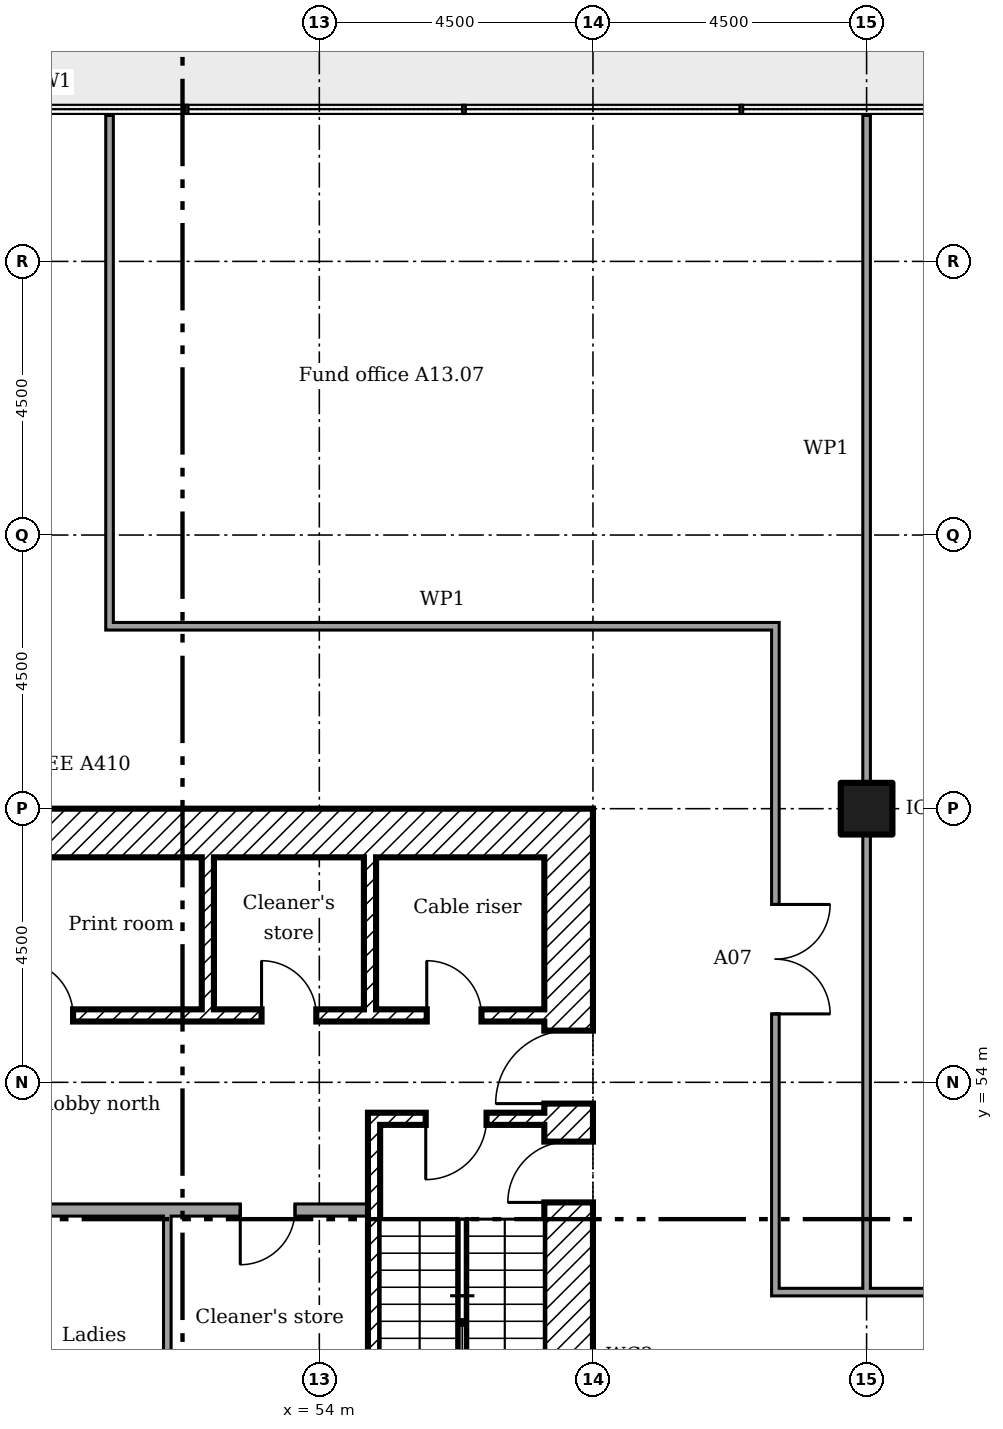
"""IFC4 building model, lengths in metres.
Left out: names, types, materials, properties, quantities, classifications, styles, units other than length and angle.
Written with IfcOpenShell. Run it as: python <this file> out.ifc"""

import sys

from ifc_helpers import new_model, si_unit, direction, frame, frame_2d, origin, origin_2d, place, context, subcontext, project, spatial, rectangle, extrude, element, fill, save


model = new_model("IFC4")
c1 = context("Model", 3, precision=1e-05, world=origin(), true_north=direction((0.0, 1.0)))
c2 = subcontext(c1, "Body", "Model", "MODEL_VIEW")
j1 = project(units=[si_unit("LENGTHUNIT", "METRE"), si_unit("PLANEANGLEUNIT", "RADIAN")], contexts=[c1])
p1 = place(None, origin())
s1 = spatial("IfcSite", under=j1, at=p1, CompositionType="ELEMENT")
p2 = place(p1, origin())
s2 = spatial("IfcBuilding", under=s1, at=p2, CompositionType="ELEMENT")
p3 = place(p2, frame((0.0, 0.0, 58.2)))
s3 = spatial("IfcBuildingStorey", under=s2, at=p3, CompositionType="ELEMENT", Elevation=58.2)
p4 = place(p3, frame((63.0, 58.5, 0.0)))
e1 = element("IfcColumn", 1, at=p4, inside=s3, PredefinedType="COLUMN", context=c2, shape_type="SweptSolid", body=[
    extrude(rectangle(XDim=0.85, YDim=0.85, at=origin_2d()), origin(), (0.0, 0.0, 1.0), 3.6),
])
p5 = place(p3, frame((58.1, 40.5, 0.0), z_axis=(0.0, 0.0, 1.0), x_axis=(0.0, 1.0, 0.0)))
e2 = element("IfcWall", 2, at=p5, inside=s3, PredefinedType="SHEAR", context=c2, shape_type="SweptSolid", body=[
    extrude(rectangle(XDim=18.0, YDim=0.8, at=frame_2d((9.0, 0.0))), origin(), (0.0, 0.0, 1.0), 3.35),
])
p6 = place(p5, frame((13.15, 0.0, 0.0)))
e3 = element("IfcOpeningElement", 3, at=p6, cuts=e2, PredefinedType="OPENING", context=c2, shape_type="SweptSolid", body=[
    extrude(rectangle(XDim=1.2, YDim=2.1, at=frame_2d((0.6, 1.05))), frame((0.0, 0.41, 0.0), z_axis=(0.0, -1.0, 0.0), x_axis=(1.0, 0.0, 0.0)), (0.0, 0.0, 1.0), 0.82),
])
p7 = place(p5, frame((3.9, 0.0, 0.0)))
e4 = element("IfcOpeningElement", 4, at=p7, cuts=e2, PredefinedType="OPENING", context=c2, shape_type="SweptSolid", body=[
    extrude(rectangle(XDim=1.8, YDim=2.1, at=frame_2d((0.9, 1.05))), frame((0.0, 0.41, 0.0), z_axis=(0.0, -1.0, 0.0), x_axis=(1.0, 0.0, 0.0)), (0.0, 0.0, 1.0), 0.82),
])
p8 = place(p5, frame((11.525, 0.0, 0.0)))
e5 = element("IfcOpeningElement", 5, at=p8, cuts=e2, PredefinedType="OPENING", context=c2, shape_type="SweptSolid", body=[
    extrude(rectangle(XDim=1.0, YDim=2.1, at=frame_2d((0.5, 1.05))), frame((0.0, 0.41, 0.0), z_axis=(0.0, -1.0, 0.0), x_axis=(1.0, 0.0, 0.0)), (0.0, 0.0, 1.0), 0.82),
])
p9 = place(p3, frame((41.3, 58.1, 0.0)))
e6 = element("IfcWall", 6, at=p9, inside=s3, PredefinedType="SHEAR", context=c2, shape_type="SweptSolid", body=[
    extrude(rectangle(XDim=16.4, YDim=0.8, at=frame_2d((8.2, 0.0))), origin(), (0.0, 0.0, 1.0), 3.35),
])
for number, where, z_axis, x_axis in (
    (7, (52.167, 57.7, 0.0), (0.0, 0.0, 1.0), (0.0, -1.0, 0.0)),
    (8, (54.833, 57.7, 0.0), (0.0, 0.0, 1.0), (0.0, -1.0, 0.0)),
):
    element("IfcWall", number, at=place(p3, frame(where, z_axis=z_axis, x_axis=x_axis)), inside=s3, PredefinedType="SHEAR", context=c2, shape_type="SweptSolid", body=[
        extrude(rectangle(XDim=2.5, YDim=0.2, at=frame_2d((1.25, 0.0))), origin(), (0.0, 0.0, 1.0), 3.35),
    ])
p10 = place(p3, frame((46.933, 55.1, 0.0)))
e9 = element("IfcWall", 9, at=p10, inside=s3, PredefinedType="SHEAR", context=c2, shape_type="SweptSolid", body=[
    extrude(rectangle(XDim=10.767, YDim=0.2, at=frame_2d((5.383, 0.0))), origin(), (0.0, 0.0, 1.0), 3.35),
])
p11 = place(p10, frame((8.833, 0.0, 0.0)))
e10 = element("IfcOpeningElement", 10, at=p11, cuts=e9, PredefinedType="OPENING", context=c2, shape_type="SweptSolid", body=[
    extrude(rectangle(XDim=0.9, YDim=2.1, at=frame_2d((0.45, 1.05))), frame((0.0, 0.11, 0.0), z_axis=(0.0, -1.0, 0.0), x_axis=(1.0, 0.0, 0.0)), (0.0, 0.0, 1.0), 0.22),
])
p12 = place(p10, frame((2.117, 0.0, 0.0)))
e11 = element("IfcOpeningElement", 11, at=p12, cuts=e9, PredefinedType="OPENING", context=c2, shape_type="SweptSolid", body=[
    extrude(rectangle(XDim=0.9, YDim=2.1, at=frame_2d((0.45, 1.05))), frame((0.0, 0.11, 0.0), z_axis=(0.0, -1.0, 0.0), x_axis=(1.0, 0.0, 0.0)), (0.0, 0.0, 1.0), 0.22),
])
p13 = place(p10, frame((6.117, 0.0, 0.0)))
e12 = element("IfcOpeningElement", 12, at=p13, cuts=e9, PredefinedType="OPENING", context=c2, shape_type="SweptSolid", body=[
    extrude(rectangle(XDim=0.9, YDim=2.1, at=frame_2d((0.45, 1.05))), frame((0.0, 0.11, 0.0), z_axis=(0.0, -1.0, 0.0), x_axis=(1.0, 0.0, 0.0)), (0.0, 0.0, 1.0), 0.22),
])
p14 = place(p3, frame((54.8, 53.4, 0.0)))
e13 = element("IfcWall", 13, at=p14, inside=s3, PredefinedType="SHEAR", context=c2, shape_type="SweptSolid", body=[
    extrude(rectangle(XDim=2.9, YDim=0.2, at=frame_2d((1.45, 0.0))), origin(), (0.0, 0.0, 1.0), 3.35),
])
p15 = place(p14, frame((0.95, 0.0, 0.0)))
e14 = element("IfcOpeningElement", 14, at=p15, cuts=e13, PredefinedType="OPENING", context=c2, shape_type="SweptSolid", body=[
    extrude(rectangle(XDim=1.0, YDim=2.1, at=frame_2d((0.5, 1.05))), frame((0.0, 0.11, 0.0), z_axis=(0.0, -1.0, 0.0), x_axis=(1.0, 0.0, 0.0)), (0.0, 0.0, 1.0), 0.22),
])
p16 = place(p3, frame((54.9, 46.8, 0.0), z_axis=(0.0, 0.0, 1.0), x_axis=(0.0, 1.0, 0.0)))
e15 = element("IfcWall", 15, at=p16, inside=s3, PredefinedType="SHEAR", context=c2, shape_type="SweptSolid", body=[
    extrude(rectangle(XDim=6.5, YDim=0.2, at=frame_2d((3.25, 0.0))), origin(), (0.0, 0.0, 1.0), 3.35),
])
p17 = place(p3, frame((44.2, 51.9, 0.0)))
e16 = element("IfcWall", 16, at=p17, inside=s3, PredefinedType="PARTITIONING", context=c2, shape_type="SweptSolid", body=[
    extrude(rectangle(XDim=10.6, YDim=0.2, at=frame_2d((5.3, 0.0))), origin(), (0.0, 0.0, 1.0), 3.35),
])
p18 = place(p17, frame((8.5, 0.0, 0.0)))
e17 = element("IfcOpeningElement", 17, at=p18, cuts=e16, PredefinedType="OPENING", context=c2, shape_type="SweptSolid", body=[
    extrude(rectangle(XDim=0.9, YDim=2.1, at=frame_2d((0.45, 1.05))), frame((0.0, 0.11, 0.0), z_axis=(0.0, -1.0, 0.0), x_axis=(1.0, 0.0, 0.0)), (0.0, 0.0, 1.0), 0.22),
])
p19 = place(p3, frame((51.5, 49.5, 0.0), z_axis=(0.0, 0.0, 1.0), x_axis=(0.0, 1.0, 0.0)))
e18 = element("IfcWall", 18, at=p19, inside=s3, PredefinedType="PARTITIONING", context=c2, shape_type="SweptSolid", body=[
    extrude(rectangle(XDim=2.3, YDim=0.125, at=frame_2d((1.15, 0.0))), origin(), (0.0, 0.0, 1.0), 3.35),
])
p20 = place(p3, frame((61.438, 50.55, 0.0)))
e19 = element("IfcWall", 19, at=p20, inside=s3, PredefinedType="PARTITIONING", context=c2, shape_type="SweptSolid", body=[
    extrude(rectangle(XDim=8.462, YDim=0.125, at=frame_2d((4.231, 0.0))), origin(), (0.0, 0.0, 1.0), 3.45),
])
p21 = place(p20, frame((4.847, 0.0, 0.0)))
e20 = element("IfcOpeningElement", 20, at=p21, cuts=e19, PredefinedType="OPENING", context=c2, shape_type="SweptSolid", body=[
    extrude(rectangle(XDim=1.8, YDim=2.1, at=frame_2d((0.9, 1.05))), frame((0.0, 0.073, 0.0), z_axis=(0.0, -1.0, 0.0), x_axis=(1.0, 0.0, 0.0)), (0.0, 0.0, 1.0), 0.145),
])
p22 = place(p3, frame((50.488, 61.5, 0.0)))
e21 = element("IfcWall", 21, at=p22, inside=s3, PredefinedType="PARTITIONING", context=c2, shape_type="SweptSolid", body=[
    extrude(rectangle(XDim=11.075, YDim=0.125, at=frame_2d((5.538, 0.0))), origin(), (0.0, 0.0, 1.0), 3.45),
])
p23 = place(p3, frame((50.55, 61.562, 0.0), z_axis=(0.0, 0.0, 1.0), x_axis=(0.0, 1.0, 0.0)))
e22 = element("IfcWall", 22, at=p23, inside=s3, PredefinedType="PARTITIONING", context=c2, shape_type="SweptSolid", body=[
    extrude(rectangle(XDim=8.337, YDim=0.125, at=frame_2d((4.169, 0.0))), origin(), (0.0, 0.0, 1.0), 3.45),
])
p24 = place(p3, frame((61.5, 50.613, 0.0), z_axis=(0.0, 0.0, 1.0), x_axis=(0.0, 1.0, 0.0)))
e23 = element("IfcWall", 23, at=p24, inside=s3, PredefinedType="PARTITIONING", context=c2, shape_type="SweptSolid", body=[
    extrude(rectangle(XDim=10.825, YDim=0.125, at=frame_2d((5.413, 0.0))), origin(), (0.0, 0.0, 1.0), 3.45),
])
p25 = place(p24, frame((4.512, 0.0, 0.0)))
e24 = element("IfcOpeningElement", 24, at=p25, cuts=e23, PredefinedType="OPENING", context=c2, shape_type="SweptSolid", body=[
    extrude(rectangle(XDim=1.8, YDim=2.1, at=frame_2d((0.9, 1.05))), frame((0.0, 0.073, 0.0), z_axis=(0.0, -1.0, 0.0), x_axis=(1.0, 0.0, 0.0)), (0.0, 0.0, 1.0), 0.145),
])
p26 = place(p3, frame((63.0, 50.55, 0.0), z_axis=(0.0, 0.0, 1.0), x_axis=(0.0, 1.0, 0.0)))
e25 = element("IfcWall", 25, at=p26, inside=s3, PredefinedType="PARTITIONING", context=c2, shape_type="SweptSolid", body=[
    extrude(rectangle(XDim=7.525, YDim=0.125, at=frame_2d((3.762, 0.0))), origin(), (0.0, 0.0, 1.0), 3.45),
])
p27 = place(p3, frame((63.0, 58.925, 0.0), z_axis=(0.0, 0.0, 1.0), x_axis=(0.0, 1.0, 0.0)))
e26 = element("IfcWall", 26, at=p27, inside=s3, PredefinedType="PARTITIONING", context=c2, shape_type="SweptSolid", body=[
    extrude(rectangle(XDim=10.975, YDim=0.125, at=frame_2d((5.487, 0.0))), origin(), (0.0, 0.0, 1.0), 2.766),
])
p28 = place(p6, origin())
e27 = element("IfcDoor", 27, at=p28, inside=s3, OperationType="SINGLE_SWING_RIGHT", PredefinedType="DOOR", context=c2, shape_type="SweptSolid", body=[
    extrude(rectangle(XDim=1.2, YDim=2.1, at=frame_2d((0.6, 1.05))), frame((0.0, 0.025, 0.0), z_axis=(0.0, -1.0, 0.0), x_axis=(1.0, 0.0, 0.0)), (0.0, 0.0, 1.0), 0.05),
])
fill(e3, e27)
p29 = place(p15, frame((1.0, 0.0, 0.0), x_axis=(-1.0, 0.0, 0.0)))
e28 = element("IfcDoor", 28, at=p29, inside=s3, OperationType="SINGLE_SWING_LEFT", PredefinedType="DOOR", context=c2, shape_type="SweptSolid", body=[
    extrude(rectangle(XDim=1.0, YDim=2.1, at=frame_2d((0.5, 1.05))), frame((0.0, 0.025, 0.0), z_axis=(0.0, -1.0, 0.0), x_axis=(1.0, 0.0, 0.0)), (0.0, 0.0, 1.0), 0.05),
])
fill(e14, e28)
p30 = place(p8, origin())
e29 = element("IfcDoor", 29, at=p30, inside=s3, OperationType="SINGLE_SWING_RIGHT", PredefinedType="DOOR", context=c2, shape_type="SweptSolid", body=[
    extrude(rectangle(XDim=1.0, YDim=2.1, at=frame_2d((0.5, 1.05))), frame((0.0, 0.025, 0.0), z_axis=(0.0, -1.0, 0.0), x_axis=(1.0, 0.0, 0.0)), (0.0, 0.0, 1.0), 0.05),
])
fill(e5, e29)
p31 = place(p11, origin())
e30 = element("IfcDoor", 30, at=p31, inside=s3, OperationType="SINGLE_SWING_RIGHT", PredefinedType="DOOR", context=c2, shape_type="SweptSolid", body=[
    extrude(rectangle(XDim=0.9, YDim=2.1, at=frame_2d((0.45, 1.05))), frame((0.0, 0.025, 0.0), z_axis=(0.0, -1.0, 0.0), x_axis=(1.0, 0.0, 0.0)), (0.0, 0.0, 1.0), 0.05),
])
fill(e10, e30)
p32 = place(p12, origin())
e31 = element("IfcDoor", 31, at=p32, inside=s3, OperationType="SINGLE_SWING_RIGHT", PredefinedType="DOOR", context=c2, shape_type="SweptSolid", body=[
    extrude(rectangle(XDim=0.9, YDim=2.1, at=frame_2d((0.45, 1.05))), frame((0.0, 0.025, 0.0), z_axis=(0.0, -1.0, 0.0), x_axis=(1.0, 0.0, 0.0)), (0.0, 0.0, 1.0), 0.05),
])
fill(e11, e31)
p33 = place(p13, origin())
e32 = element("IfcDoor", 32, at=p33, inside=s3, OperationType="SINGLE_SWING_RIGHT", PredefinedType="DOOR", context=c2, shape_type="SweptSolid", body=[
    extrude(rectangle(XDim=0.9, YDim=2.1, at=frame_2d((0.45, 1.05))), frame((0.0, 0.025, 0.0), z_axis=(0.0, -1.0, 0.0), x_axis=(1.0, 0.0, 0.0)), (0.0, 0.0, 1.0), 0.05),
])
fill(e12, e32)
p34 = place(p18, frame((0.9, 0.0, 0.0), x_axis=(-1.0, 0.0, 0.0)))
e33 = element("IfcDoor", 33, at=p34, inside=s3, OperationType="SINGLE_SWING_LEFT", PredefinedType="DOOR", context=c2, shape_type="SweptSolid", body=[
    extrude(rectangle(XDim=0.9, YDim=2.1, at=frame_2d((0.45, 1.05))), frame((0.0, 0.025, 0.0), z_axis=(0.0, -1.0, 0.0), x_axis=(1.0, 0.0, 0.0)), (0.0, 0.0, 1.0), 0.05),
])
fill(e17, e33)
p35 = place(p25, frame((1.8, 0.0, 0.0), x_axis=(-1.0, 0.0, 0.0)))
e34 = element("IfcDoor", 34, at=p35, inside=s3, OperationType="DOUBLE_DOOR_SINGLE_SWING", PredefinedType="DOOR", context=c2, shape_type="SweptSolid", body=[
    extrude(rectangle(XDim=1.8, YDim=2.1, at=frame_2d((0.9, 1.05))), frame((0.0, 0.025, 0.0), z_axis=(0.0, -1.0, 0.0), x_axis=(1.0, 0.0, 0.0)), (0.0, 0.0, 1.0), 0.05),
])
fill(e24, e34)
save(model, sys.argv[1])
